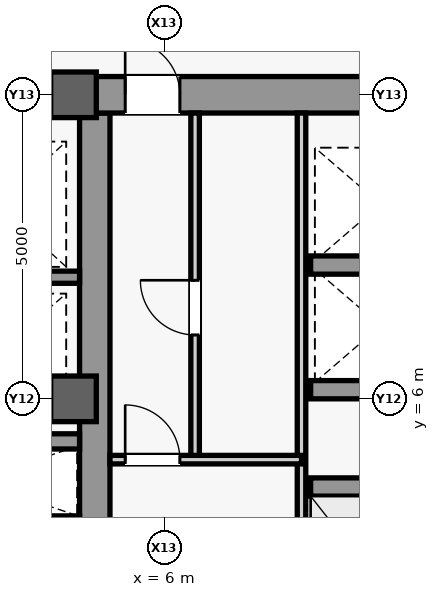
"""IFC4 building model, lengths in metres.
Left out: names, types, materials, properties, quantities, classifications, styles, units other than length and angle.
Written with IfcOpenShell. Run it as: python <this file> out.ifc"""

import sys

from ifc_helpers import new_model, si_unit, direction, frame, frame_2d, origin, origin_2d, place, context, subcontext, project, spatial, rectangle, extrude, source, transform, mapped, element, fill, save


model = new_model("IFC4")
c1 = context("Model", 3, precision=1e-05, world=origin(), true_north=direction((0.0, 1.0)))
c2 = subcontext(c1, "Body", "Model", "MODEL_VIEW")
j1 = project(units=[si_unit("LENGTHUNIT", "METRE"), si_unit("PLANEANGLEUNIT", "RADIAN")], contexts=[c1])
p1 = place(None, origin())
s1 = spatial("IfcSite", under=j1, at=p1, CompositionType="ELEMENT")
p2 = place(p1, origin())
s2 = spatial("IfcBuilding", under=s1, at=p2, CompositionType="ELEMENT")
p3 = place(p2, frame((0.0, 0.0, 268.3)))
s3 = spatial("IfcBuildingStorey", under=s2, at=p3, CompositionType="ELEMENT", Elevation=268.3)
m1 = source(origin(), c2, "Body", "SweptSolid", [
    extrude(rectangle(XDim=21.4, YDim=0.5, at=frame_2d((10.7, 0.0))), origin(), (0.0, 0.0, 1.0), 4.98),
])
p4 = place(p3, frame((4.85, -10.7, 0.0), z_axis=(0.0, 0.0, 1.0), x_axis=(0.0, 1.0, 0.0)))
e1 = element("IfcWall", 1, at=p4, inside=s3, PredefinedType="SHEAR", context=c2, shape_type="MappedRepresentation", body=[
    mapped(m1, transform((0.0, 0.0, 0.0), scale=1.0)),
])
m2 = source(origin(), c2, "Body", "SweptSolid", [
    extrude(rectangle(XDim=5.9, YDim=0.6, at=frame_2d((2.95, 0.0))), origin(), (0.0, 0.0, 1.0), 4.98),
])
p5 = place(p3, frame((4.85, 11.0, 0.0), z_axis=(0.0, 0.0, 1.0), x_axis=(1.0, 0.0, 0.0)))
e2 = element("IfcWall", 2, at=p5, inside=s3, PredefinedType="SHEAR", context=c2, shape_type="MappedRepresentation", body=[
    mapped(m2, transform((0.0, 0.0, 0.0), scale=1.0)),
])
m3 = source(origin(), c2, "Body", "SweptSolid", [
    extrude(rectangle(XDim=0.9, YDim=2.15, at=frame_2d((0.45, 1.075))), frame((0.0, 0.31, 0.0), z_axis=(0.0, -1.0, 0.0), x_axis=(1.0, 0.0, 0.0)), (0.0, 0.0, 1.0), 0.62),
])
p6 = place(p5, frame((0.5, 0.0, 0.0)))
e3 = element("IfcOpeningElement", 3, at=p6, cuts=e2, PredefinedType="OPENING", context=c2, shape_type="MappedRepresentation", body=[
    mapped(m3, transform((0.0, 0.0, 0.0), scale=1.0)),
])
m4 = source(origin(), c2, "Body", "SweptSolid", [
    extrude(rectangle(XDim=9.2, YDim=0.5, at=frame_2d((4.6, 0.0))), origin(), (0.0, 0.0, 1.0), 4.98),
])
p7 = place(p3, frame((-4.6, 11.0, 0.0), z_axis=(0.0, 0.0, 1.0), x_axis=(1.0, 0.0, 0.0)))
e4 = element("IfcWall", 4, at=p7, inside=s3, PredefinedType="SHEAR", context=c2, shape_type="MappedRepresentation", body=[
    mapped(m4, transform((0.0, 0.0, 0.0), scale=1.0)),
])
m5 = source(origin(), c2, "Body", "SweptSolid", [
    extrude(rectangle(XDim=1.8, YDim=2.25, at=frame_2d((0.9, 1.125))), frame((0.0, 0.26, 0.0), z_axis=(0.0, -1.0, 0.0), x_axis=(1.0, 0.0, 0.0)), (0.0, 0.0, 1.0), 0.52),
])
p8 = place(p7, frame((3.7, 0.0, 0.0)))
e5 = element("IfcOpeningElement", 5, at=p8, cuts=e4, PredefinedType="OPENING", context=c2, shape_type="MappedRepresentation", body=[
    mapped(m5, transform((0.0, 0.0, 0.0), scale=1.0)),
])
m6 = source(origin(), c2, "Body", "SweptSolid", [
    extrude(rectangle(XDim=0.75, YDim=0.75, at=origin_2d()), origin(), (0.0, 0.0, 1.0), 5.2),
])
for number, where, z_axis, x_axis in (
    (6, (4.5, 6.0, 0.0), (0.0, 0.0, 1.0), (1.0, 0.0, 0.0)),
    (7, (4.5, 11.0, 0.0), (0.0, 0.0, 1.0), (1.0, 0.0, 0.0)),
):
    element("IfcColumn", number, at=place(p3, frame(where, z_axis=z_axis, x_axis=x_axis)), inside=s3, PredefinedType="COLUMN", context=c2, shape_type="MappedRepresentation", body=[
        mapped(m6, transform((0.0, 0.0, 0.0), scale=1.0)),
    ])
m7 = source(origin(), c2, "Body", "SweptSolid", [
    extrude(rectangle(XDim=2.3, YDim=0.3, at=frame_2d((1.15, 0.0))), origin(), (0.0, 0.0, 1.0), 4.98),
])
for number, where, z_axis, x_axis in (
    (8, (8.4, 4.55, 0.0), (0.0, 0.0, 1.0), (1.0, 0.0, 0.0)),
    (9, (8.4, 6.15, 0.0), (0.0, 0.0, 1.0), (1.0, 0.0, 0.0)),
    (10, (8.4, 8.2, 0.0), (0.0, 0.0, 1.0), (1.0, 0.0, 0.0)),
):
    element("IfcWall", number, at=place(p3, frame(where, z_axis=z_axis, x_axis=x_axis)), inside=s3, PredefinedType="SHEAR", context=c2, shape_type="MappedRepresentation", body=[
        mapped(m7, transform((0.0, 0.0, 0.0), scale=1.0)),
    ])
m8 = source(origin(), c2, "Body", "SweptSolid", [
    extrude(rectangle(XDim=9.4, YDim=0.14, at=frame_2d((4.7, 0.0))), origin(), (0.0, 0.0, 1.0), 4.98),
])
p9 = place(p3, frame((8.25, 1.3, 0.0), z_axis=(0.0, 0.0, 1.0), x_axis=(0.0, 1.0, 0.0)))
e11 = element("IfcWall", 11, at=p9, inside=s3, PredefinedType="PARTITIONING", context=c2, shape_type="MappedRepresentation", body=[
    mapped(m8, transform((0.0, 0.0, 0.0), scale=1.0)),
])
m9 = source(origin(), c2, "Body", "SweptSolid", [
    extrude(rectangle(XDim=5.7, YDim=0.14, at=frame_2d((2.85, 0.0))), origin(), (0.0, 0.0, 1.0), 4.98),
])
p10 = place(p3, frame((6.5, 5.0, 0.0), z_axis=(0.0, 0.0, 1.0), x_axis=(0.0, 1.0, 0.0)))
e12 = element("IfcWall", 12, at=p10, inside=s3, PredefinedType="PARTITIONING", context=c2, shape_type="MappedRepresentation", body=[
    mapped(m9, transform((0.0, 0.0, 0.0), scale=1.0)),
])
m10 = source(origin(), c2, "Body", "SweptSolid", [
    extrude(rectangle(XDim=0.9, YDim=2.15, at=frame_2d((0.45, 1.075))), frame((0.0, 0.08, 0.0), z_axis=(0.0, -1.0, 0.0), x_axis=(1.0, 0.0, 0.0)), (0.0, 0.0, 1.0), 0.16),
])
p11 = place(p10, frame((2.05, 0.0, 0.0)))
e13 = element("IfcOpeningElement", 13, at=p11, cuts=e12, PredefinedType="OPENING", context=c2, shape_type="MappedRepresentation", body=[
    mapped(m10, transform((0.0, 0.0, 0.0), scale=1.0)),
])
m11 = source(origin(), c2, "Body", "SweptSolid", [
    extrude(rectangle(XDim=3.15, YDim=0.14, at=frame_2d((1.575, 0.0))), origin(), (0.0, 0.0, 1.0), 4.98),
])
p12 = place(p3, frame((5.1, 5.0, 0.0), z_axis=(0.0, 0.0, 1.0), x_axis=(1.0, 0.0, 0.0)))
e14 = element("IfcWall", 14, at=p12, inside=s3, PredefinedType="PARTITIONING", context=c2, shape_type="MappedRepresentation", body=[
    mapped(m11, transform((0.0, 0.0, 0.0), scale=1.0)),
])
p13 = place(p12, frame((0.25, 0.0, 0.0)))
e15 = element("IfcOpeningElement", 15, at=p13, cuts=e14, PredefinedType="OPENING", context=c2, shape_type="MappedRepresentation", body=[
    mapped(m10, transform((0.0, 0.0, 0.0), scale=1.0)),
])
m12 = source(origin(), c2, "Body", "SweptSolid", [
    extrude(rectangle(XDim=3.45, YDim=0.15, at=frame_2d((1.725, 0.0))), origin(), (0.0, 0.0, 1.0), 4.98),
])
p14 = place(p3, frame((1.15, 4.0, 0.0), z_axis=(0.0, 0.0, 1.0), x_axis=(1.0, 0.0, 0.0)))
e16 = element("IfcWall", 16, at=p14, inside=s3, PredefinedType="PARTITIONING", context=c2, shape_type="MappedRepresentation", body=[
    mapped(m12, transform((0.0, 0.0, 0.0), scale=1.0)),
])
m13 = source(origin(), c2, "Body", "SweptSolid", [
    extrude(rectangle(XDim=2.45, YDim=0.2, at=frame_2d((1.225, 0.0))), origin(), (0.0, 0.0, 1.0), 4.98),
])
p15 = place(p3, frame((2.15, 8.0, 0.0), z_axis=(0.0, 0.0, 1.0), x_axis=(1.0, 0.0, 0.0)))
e17 = element("IfcWall", 17, at=p15, inside=s3, PredefinedType="SHEAR", context=c2, shape_type="MappedRepresentation", body=[
    mapped(m13, transform((0.0, 0.0, 0.0), scale=1.0)),
])
m14 = source(origin(), c2, "Body", "SweptSolid", [
    extrude(rectangle(XDim=9.2, YDim=0.25, at=frame_2d((4.6, 0.0))), origin(), (0.0, 0.0, 1.0), 4.98),
])
p16 = place(p3, frame((-4.6, 5.3, 0.0), z_axis=(0.0, 0.0, 1.0), x_axis=(1.0, 0.0, 0.0)))
e18 = element("IfcWall", 18, at=p16, inside=s3, PredefinedType="SHEAR", context=c2, shape_type="MappedRepresentation", body=[
    mapped(m14, transform((0.0, 0.0, 0.0), scale=1.0)),
])
m15 = source(origin(), c2, "Body", "SweptSolid", [
    extrude(rectangle(XDim=1.05, YDim=2.2, at=frame_2d((0.525, 1.1))), frame((0.0, 0.135, 0.0), z_axis=(0.0, -1.0, 0.0), x_axis=(1.0, 0.0, 0.0)), (0.0, 0.0, 1.0), 0.27),
])
p17 = place(p16, frame((4.075, 0.0, 0.0)))
e19 = element("IfcOpeningElement", 19, at=p17, cuts=e18, PredefinedType="OPENING", context=c2, shape_type="MappedRepresentation", body=[
    mapped(m15, transform((0.0, 0.0, 0.0), scale=1.0)),
])
m16 = source(origin(), c2, "Body", "SweptSolid", [
    extrude(rectangle(XDim=0.9, YDim=2.15, at=frame_2d((0.45, 1.075))), frame((0.0, 0.025, 0.0), z_axis=(0.0, -1.0, 0.0), x_axis=(1.0, 0.0, 0.0)), (0.0, 0.0, 1.0), 0.05),
])
p18 = place(p6, origin())
e20 = element("IfcDoor", 20, at=p18, inside=s3, OperationType="SINGLE_SWING_LEFT", PredefinedType="DOOR", context=c2, shape_type="MappedRepresentation", body=[
    mapped(m16, transform((0.0, 0.0, 0.0), scale=1.0)),
])
fill(e3, e20)
p19 = place(p11, origin())
e21 = element("IfcDoor", 21, at=p19, inside=s3, OperationType="SINGLE_SWING_RIGHT", PredefinedType="DOOR", context=c2, shape_type="MappedRepresentation", body=[
    mapped(m16, transform((0.0, 0.0, 0.0), scale=1.0)),
])
fill(e13, e21)
p20 = place(p13, origin())
e22 = element("IfcDoor", 22, at=p20, inside=s3, OperationType="SINGLE_SWING_LEFT", PredefinedType="DOOR", context=c2, shape_type="MappedRepresentation", body=[
    mapped(m16, transform((0.0, 0.0, 0.0), scale=1.0)),
])
fill(e15, e22)
save(model, sys.argv[1])
